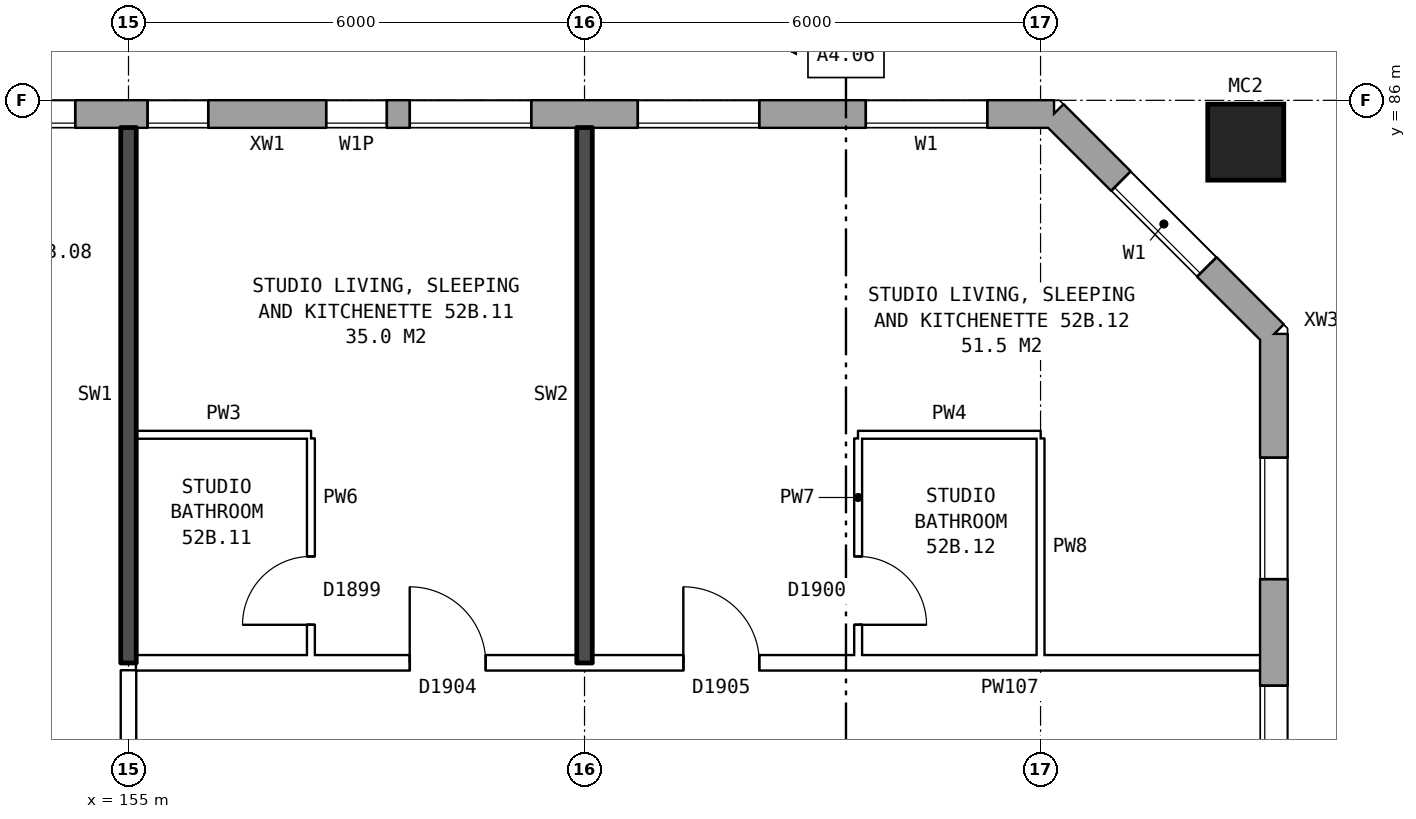
"""IFC4 building model, lengths in metres.
Left out: names, types, materials, properties, quantities, classifications, styles, units other than length and angle.
Written with IfcOpenShell. Run it as: python <this file> out.ifc"""

import sys

from ifc_helpers import new_model, si_unit, direction, frame, frame_2d, origin, origin_2d, place, context, subcontext, project, spatial, rectangle, hollow_rectangle, extrude, element, fill, save


model = new_model("IFC4")
c1 = context("Model", 3, precision=1e-05, world=origin(), true_north=direction((0.0, 1.0)))
c2 = subcontext(c1, "Body", "Model", "MODEL_VIEW")
j1 = project(units=[si_unit("LENGTHUNIT", "METRE"), si_unit("PLANEANGLEUNIT", "RADIAN")], contexts=[c1])
p1 = place(None, origin())
s1 = spatial("IfcSite", under=j1, at=p1, CompositionType="ELEMENT")
p2 = place(p1, origin())
s2 = spatial("IfcBuilding", under=s1, at=p2, CompositionType="ELEMENT")
p3 = place(p2, frame((0.0, 0.0, 185.1)))
s3 = spatial("IfcBuildingStorey", under=s2, at=p3, CompositionType="ELEMENT", Elevation=185.1)
p4 = place(p3, frame((169.7, 85.45, 0.0), z_axis=(0.0, 0.0, 1.0), x_axis=(1.0, 0.0, 0.0)))
e1 = element("IfcColumn", 1, at=p4, inside=s3, PredefinedType="COLUMN", context=c2, shape_type="SweptSolid", body=[
    extrude(hollow_rectangle(XDim=1.0, YDim=1.0, WallThickness=0.055, at=origin_2d()), origin(), (0.0, 0.0, 1.0), 3.1),
])
p5 = place(p3, frame((170.07, 57.075, 0.0), z_axis=(0.0, 0.0, 1.0), x_axis=(0.0, 1.0, 0.0)))
e2 = element("IfcWall", 2, at=p5, inside=s3, PredefinedType="STANDARD", context=c2, shape_type="SweptSolid", body=[
    extrude(rectangle(XDim=25.851, YDim=0.36, at=frame_2d((12.925, 0.0))), origin(), (0.0, 0.0, 1.0), 2.85),
])
p6 = place(p5, frame((1.625, 0.0, 0.8)))
e3 = element("IfcOpeningElement", 3, at=p6, cuts=e2, PredefinedType="OPENING", context=c2, shape_type="SweptSolid", body=[
    extrude(rectangle(XDim=1.6, YDim=1.8, at=frame_2d((0.8, 0.9))), frame((0.0, 0.19, 0.0), z_axis=(0.0, -1.0, 0.0), x_axis=(1.0, 0.0, 0.0)), (0.0, 0.0, 1.0), 0.38),
])
p7 = place(p5, frame((4.625, 0.0, 0.8)))
e4 = element("IfcOpeningElement", 4, at=p7, cuts=e2, PredefinedType="OPENING", context=c2, shape_type="SweptSolid", body=[
    extrude(rectangle(XDim=1.6, YDim=1.8, at=frame_2d((0.8, 0.9))), frame((0.0, 0.19, 0.0), z_axis=(0.0, -1.0, 0.0), x_axis=(1.0, 0.0, 0.0)), (0.0, 0.0, 1.0), 0.38),
])
p8 = place(p5, frame((8.025, 0.0, 1.7)))
e5 = element("IfcOpeningElement", 5, at=p8, cuts=e2, PredefinedType="OPENING", context=c2, shape_type="SweptSolid", body=[
    extrude(rectangle(XDim=1.0, YDim=0.9, at=frame_2d((0.5, 0.45))), frame((0.0, 0.19, 0.0), z_axis=(0.0, -1.0, 0.0), x_axis=(1.0, 0.0, 0.0)), (0.0, 0.0, 1.0), 0.38),
])
p9 = place(p5, frame((10.625, 0.0, 0.8)))
e6 = element("IfcOpeningElement", 6, at=p9, cuts=e2, PredefinedType="OPENING", context=c2, shape_type="SweptSolid", body=[
    extrude(rectangle(XDim=1.6, YDim=1.8, at=frame_2d((0.8, 0.9))), frame((0.0, 0.19, 0.0), z_axis=(0.0, -1.0, 0.0), x_axis=(1.0, 0.0, 0.0)), (0.0, 0.0, 1.0), 0.38),
])
p10 = place(p5, frame((13.625, 0.0, 0.8)))
e7 = element("IfcOpeningElement", 7, at=p10, cuts=e2, PredefinedType="OPENING", context=c2, shape_type="SweptSolid", body=[
    extrude(rectangle(XDim=1.6, YDim=1.8, at=frame_2d((0.8, 0.9))), frame((0.0, 0.19, 0.0), z_axis=(0.0, -1.0, 0.0), x_axis=(1.0, 0.0, 0.0)), (0.0, 0.0, 1.0), 0.38),
])
p11 = place(p5, frame((9.325, 0.0, 0.8)))
e8 = element("IfcOpeningElement", 8, at=p11, cuts=e2, PredefinedType="OPENING", context=c2, shape_type="SweptSolid", body=[
    extrude(rectangle(XDim=1.0, YDim=1.8, at=frame_2d((0.5, 0.9))), frame((0.0, 0.19, 0.0), z_axis=(0.0, -1.0, 0.0), x_axis=(1.0, 0.0, 0.0)), (0.0, 0.0, 1.0), 0.38),
])
p12 = place(p5, frame((19.625, 0.0, 0.8)))
e9 = element("IfcOpeningElement", 9, at=p12, cuts=e2, PredefinedType="OPENING", context=c2, shape_type="SweptSolid", body=[
    extrude(rectangle(XDim=1.6, YDim=1.8, at=frame_2d((0.8, 0.9))), frame((0.0, 0.19, 0.0), z_axis=(0.0, -1.0, 0.0), x_axis=(1.0, 0.0, 0.0)), (0.0, 0.0, 1.0), 0.38),
])
p13 = place(p5, frame((22.625, 0.0, 0.8)))
e10 = element("IfcOpeningElement", 10, at=p13, cuts=e2, PredefinedType="OPENING", context=c2, shape_type="SweptSolid", body=[
    extrude(rectangle(XDim=1.6, YDim=1.8, at=frame_2d((0.8, 0.9))), frame((0.0, 0.19, 0.0), z_axis=(0.0, -1.0, 0.0), x_axis=(1.0, 0.0, 0.0)), (0.0, 0.0, 1.0), 0.38),
])
p14 = place(p5, frame((12.525, 0.0, 0.8)))
e11 = element("IfcOpeningElement", 11, at=p14, cuts=e2, PredefinedType="OPENING", context=c2, shape_type="SweptSolid", body=[
    extrude(rectangle(XDim=0.8, YDim=1.8, at=frame_2d((0.4, 0.9))), frame((0.0, 0.19, 0.0), z_axis=(0.0, -1.0, 0.0), x_axis=(1.0, 0.0, 0.0)), (0.0, 0.0, 1.0), 0.38),
])
p15 = place(p5, frame((15.525, 0.0, 0.8)))
e12 = element("IfcOpeningElement", 12, at=p15, cuts=e2, PredefinedType="OPENING", context=c2, shape_type="SweptSolid", body=[
    extrude(rectangle(XDim=1.0, YDim=1.8, at=frame_2d((0.5, 0.9))), frame((0.0, 0.19, 0.0), z_axis=(0.0, -1.0, 0.0), x_axis=(1.0, 0.0, 0.0)), (0.0, 0.0, 1.0), 0.38),
])
p16 = place(p5, frame((16.825, 0.0, 1.7)))
e13 = element("IfcOpeningElement", 13, at=p16, cuts=e2, PredefinedType="OPENING", context=c2, shape_type="SweptSolid", body=[
    extrude(rectangle(XDim=1.0, YDim=0.9, at=frame_2d((0.5, 0.45))), frame((0.0, 0.19, 0.0), z_axis=(0.0, -1.0, 0.0), x_axis=(1.0, 0.0, 0.0)), (0.0, 0.0, 1.0), 0.38),
])
p17 = place(p3, frame((170.07, 82.925, 0.0), z_axis=(0.0, 0.0, 1.0), x_axis=(-0.707106781187, 0.707106781187, 0.0)))
e14 = element("IfcWall", 14, at=p17, inside=s3, PredefinedType="STANDARD", context=c2, shape_type="SweptSolid", body=[
    extrude(rectangle(XDim=4.094, YDim=0.36, at=frame_2d((2.047, 0.0))), origin(), (0.0, 0.0, 1.0), 2.85),
])
p18 = place(p17, frame((1.247, 0.0, 0.8)))
e15 = element("IfcOpeningElement", 15, at=p18, cuts=e14, PredefinedType="OPENING", context=c2, shape_type="SweptSolid", body=[
    extrude(rectangle(XDim=1.6, YDim=1.8, at=frame_2d((0.8, 0.9))), frame((0.0, 0.19, 0.0), z_axis=(0.0, -1.0, 0.0), x_axis=(1.0, 0.0, 0.0)), (0.0, 0.0, 1.0), 0.38),
])
p19 = place(p3, frame((167.175, 85.82, 0.0), z_axis=(0.0, 0.0, 1.0), x_axis=(-1.0, 0.0, 0.0)))
e16 = element("IfcWall", 16, at=p19, inside=s3, PredefinedType="STANDARD", context=c2, shape_type="SweptSolid", body=[
    extrude(rectangle(XDim=33.101, YDim=0.36, at=frame_2d((16.55, 0.0))), origin(), (0.0, 0.0, 1.0), 2.85),
])
p20 = place(p19, frame((0.875, 0.0, 0.8)))
e17 = element("IfcOpeningElement", 17, at=p20, cuts=e16, PredefinedType="OPENING", context=c2, shape_type="SweptSolid", body=[
    extrude(rectangle(XDim=1.6, YDim=1.8, at=frame_2d((0.8, 0.9))), frame((0.0, 0.19, 0.0), z_axis=(0.0, -1.0, 0.0), x_axis=(1.0, 0.0, 0.0)), (0.0, 0.0, 1.0), 0.38),
])
p21 = place(p19, frame((3.875, 0.0, 0.8)))
e18 = element("IfcOpeningElement", 18, at=p21, cuts=e16, PredefinedType="OPENING", context=c2, shape_type="SweptSolid", body=[
    extrude(rectangle(XDim=1.6, YDim=1.8, at=frame_2d((0.8, 0.9))), frame((0.0, 0.19, 0.0), z_axis=(0.0, -1.0, 0.0), x_axis=(1.0, 0.0, 0.0)), (0.0, 0.0, 1.0), 0.38),
])
p22 = place(p19, frame((6.875, 0.0, 0.8)))
e19 = element("IfcOpeningElement", 19, at=p22, cuts=e16, PredefinedType="OPENING", context=c2, shape_type="SweptSolid", body=[
    extrude(rectangle(XDim=1.6, YDim=1.8, at=frame_2d((0.8, 0.9))), frame((0.0, 0.19, 0.0), z_axis=(0.0, -1.0, 0.0), x_axis=(1.0, 0.0, 0.0)), (0.0, 0.0, 1.0), 0.38),
])
p23 = place(p19, frame((8.775, 0.0, 1.4)))
e20 = element("IfcOpeningElement", 20, at=p23, cuts=e16, PredefinedType="OPENING", context=c2, shape_type="SweptSolid", body=[
    extrude(rectangle(XDim=0.8, YDim=1.2, at=frame_2d((0.4, 0.6))), frame((0.0, 0.19, 0.0), z_axis=(0.0, -1.0, 0.0), x_axis=(1.0, 0.0, 0.0)), (0.0, 0.0, 1.0), 0.38),
])
p24 = place(p19, frame((12.875, 0.0, 0.8)))
e21 = element("IfcOpeningElement", 21, at=p24, cuts=e16, PredefinedType="OPENING", context=c2, shape_type="SweptSolid", body=[
    extrude(rectangle(XDim=1.6, YDim=1.8, at=frame_2d((0.8, 0.9))), frame((0.0, 0.19, 0.0), z_axis=(0.0, -1.0, 0.0), x_axis=(1.0, 0.0, 0.0)), (0.0, 0.0, 1.0), 0.38),
])
p25 = place(p19, frame((15.875, 0.0, 0.8)))
e22 = element("IfcOpeningElement", 22, at=p25, cuts=e16, PredefinedType="OPENING", context=c2, shape_type="SweptSolid", body=[
    extrude(rectangle(XDim=1.6, YDim=1.8, at=frame_2d((0.8, 0.9))), frame((0.0, 0.19, 0.0), z_axis=(0.0, -1.0, 0.0), x_axis=(1.0, 0.0, 0.0)), (0.0, 0.0, 1.0), 0.38),
])
p26 = place(p19, frame((18.875, 0.0, 0.8)))
e23 = element("IfcOpeningElement", 23, at=p26, cuts=e16, PredefinedType="OPENING", context=c2, shape_type="SweptSolid", body=[
    extrude(rectangle(XDim=1.6, YDim=1.8, at=frame_2d((0.8, 0.9))), frame((0.0, 0.19, 0.0), z_axis=(0.0, -1.0, 0.0), x_axis=(1.0, 0.0, 0.0)), (0.0, 0.0, 1.0), 0.38),
])
p27 = place(p19, frame((21.325, 0.0, 0.25)))
e24 = element("IfcOpeningElement", 24, at=p27, cuts=e16, PredefinedType="OPENING", context=c2, shape_type="SweptSolid", body=[
    extrude(rectangle(XDim=0.6, YDim=1.8, at=frame_2d((0.3, 0.9))), frame((0.0, 0.19, 0.0), z_axis=(0.0, -1.0, 0.0), x_axis=(1.0, 0.0, 0.0)), (0.0, 0.0, 1.0), 0.38),
])
p28 = place(p19, frame((24.875, 0.0, 0.8)))
e25 = element("IfcOpeningElement", 25, at=p28, cuts=e16, PredefinedType="OPENING", context=c2, shape_type="SweptSolid", body=[
    extrude(rectangle(XDim=1.6, YDim=1.8, at=frame_2d((0.8, 0.9))), frame((0.0, 0.19, 0.0), z_axis=(0.0, -1.0, 0.0), x_axis=(1.0, 0.0, 0.0)), (0.0, 0.0, 1.0), 0.38),
])
p29 = place(p19, frame((27.875, 0.0, 0.8)))
e26 = element("IfcOpeningElement", 26, at=p29, cuts=e16, PredefinedType="OPENING", context=c2, shape_type="SweptSolid", body=[
    extrude(rectangle(XDim=1.6, YDim=1.8, at=frame_2d((0.8, 0.9))), frame((0.0, 0.19, 0.0), z_axis=(0.0, -1.0, 0.0), x_axis=(1.0, 0.0, 0.0)), (0.0, 0.0, 1.0), 0.38),
])
p30 = place(p19, frame((30.875, 0.0, 0.8)))
e27 = element("IfcOpeningElement", 27, at=p30, cuts=e16, PredefinedType="OPENING", context=c2, shape_type="SweptSolid", body=[
    extrude(rectangle(XDim=1.6, YDim=1.8, at=frame_2d((0.8, 0.9))), frame((0.0, 0.19, 0.0), z_axis=(0.0, -1.0, 0.0), x_axis=(1.0, 0.0, 0.0)), (0.0, 0.0, 1.0), 0.38),
])
p31 = place(p19, frame((11.125, 0.0, 0.8)))
e28 = element("IfcOpeningElement", 28, at=p31, cuts=e16, PredefinedType="OPENING", context=c2, shape_type="SweptSolid", body=[
    extrude(rectangle(XDim=0.8, YDim=1.2, at=frame_2d((0.4, 0.6))), frame((0.0, 0.19, 0.0), z_axis=(0.0, -1.0, 0.0), x_axis=(1.0, 0.0, 0.0)), (0.0, 0.0, 1.0), 0.38),
])
p32 = place(p19, frame((22.225, 0.0, 0.15)))
e29 = element("IfcOpeningElement", 29, at=p32, cuts=e16, PredefinedType="OPENING", context=c2, shape_type="SweptSolid", body=[
    extrude(rectangle(XDim=0.6, YDim=0.9, at=frame_2d((0.3, 0.45))), frame((0.0, 0.19, 0.0), z_axis=(0.0, -1.0, 0.0), x_axis=(1.0, 0.0, 0.0)), (0.0, 0.0, 1.0), 0.38),
])
p33 = place(p19, frame((23.325, 0.0, 1.65)))
e30 = element("IfcOpeningElement", 30, at=p33, cuts=e16, PredefinedType="OPENING", context=c2, shape_type="SweptSolid", body=[
    extrude(rectangle(XDim=0.6, YDim=0.9, at=frame_2d((0.3, 0.45))), frame((0.0, 0.19, 0.0), z_axis=(0.0, -1.0, 0.0), x_axis=(1.0, 0.0, 0.0)), (0.0, 0.0, 1.0), 0.38),
])
p34 = place(p3, frame((155.1, 78.6, 0.0), z_axis=(0.0, 0.0, 1.0), x_axis=(1.0, 0.0, 0.0)))
e31 = element("IfcWall", 31, at=p34, inside=s3, PredefinedType="PARTITIONING", context=c2, shape_type="SweptSolid", body=[
    extrude(rectangle(XDim=14.79, YDim=0.2, at=frame_2d((7.395, 0.0))), origin(), (0.0, 0.0, 1.0), 2.85),
])
p35 = place(p34, frame((3.6, 0.0, 0.0)))
e32 = element("IfcOpeningElement", 32, at=p35, cuts=e31, PredefinedType="OPENING", context=c2, shape_type="SweptSolid", body=[
    extrude(rectangle(XDim=1.0, YDim=2.1, at=frame_2d((0.5, 1.05))), frame((0.0, 0.11, 0.0), z_axis=(0.0, -1.0, 0.0), x_axis=(1.0, 0.0, 0.0)), (0.0, 0.0, 1.0), 0.22),
])
p36 = place(p34, frame((7.2, 0.0, 0.0)))
e33 = element("IfcOpeningElement", 33, at=p36, cuts=e31, PredefinedType="OPENING", context=c2, shape_type="SweptSolid", body=[
    extrude(rectangle(XDim=1.0, YDim=2.1, at=frame_2d((0.5, 1.05))), frame((0.0, 0.11, 0.0), z_axis=(0.0, -1.0, 0.0), x_axis=(1.0, 0.0, 0.0)), (0.0, 0.0, 1.0), 0.22),
])
p37 = place(p3, frame((155.1, 81.6, 0.0), z_axis=(0.0, 0.0, 1.0), x_axis=(1.0, 0.0, 0.0)))
e34 = element("IfcWall", 34, at=p37, inside=s3, PredefinedType="PARTITIONING", context=c2, shape_type="SweptSolid", body=[
    extrude(rectangle(XDim=2.3, YDim=0.1, at=frame_2d((1.15, 0.0))), origin(), (0.0, 0.0, 1.0), 2.85),
])
p38 = place(p3, frame((164.6, 81.6, 0.0), z_axis=(0.0, 0.0, 1.0), x_axis=(1.0, 0.0, 0.0)))
e35 = element("IfcWall", 35, at=p38, inside=s3, PredefinedType="PARTITIONING", context=c2, shape_type="SweptSolid", body=[
    extrude(rectangle(XDim=2.4, YDim=0.1, at=frame_2d((1.2, 0.0))), origin(), (0.0, 0.0, 1.0), 2.85),
])
p39 = place(p3, frame((155.0, 76.3, 0.0), z_axis=(0.0, 0.0, 1.0), x_axis=(0.0, 1.0, 0.0)))
e36 = element("IfcWall", 36, at=p39, inside=s3, PredefinedType="PARTITIONING", context=c2, shape_type="SweptSolid", body=[
    extrude(rectangle(XDim=2.2, YDim=0.2, at=frame_2d((1.1, 0.0))), origin(), (0.0, 0.0, 1.0), 2.85),
])
p40 = place(p3, frame((155.0, 78.6, 0.0), z_axis=(0.0, 0.0, 1.0), x_axis=(0.0, 1.0, 0.0)))
e37 = element("IfcWall", 37, at=p40, inside=s3, PredefinedType="SOLIDWALL", context=c2, shape_type="SweptSolid", body=[
    extrude(rectangle(XDim=7.04, YDim=0.2, at=frame_2d((3.52, 0.0))), origin(), (0.0, 0.0, 1.0), 2.85),
])
p41 = place(p3, frame((157.4, 78.7, 0.0), z_axis=(0.0, 0.0, 1.0), x_axis=(0.0, 1.0, 0.0)))
e38 = element("IfcWall", 38, at=p41, inside=s3, PredefinedType="PARTITIONING", context=c2, shape_type="SweptSolid", body=[
    extrude(rectangle(XDim=2.85, YDim=0.1, at=frame_2d((1.425, 0.0))), origin(), (0.0, 0.0, 1.0), 2.85),
])
p42 = place(p41, frame((0.4, 0.0, 0.0)))
e39 = element("IfcOpeningElement", 39, at=p42, cuts=e38, PredefinedType="OPENING", context=c2, shape_type="SweptSolid", body=[
    extrude(rectangle(XDim=0.9, YDim=2.1, at=frame_2d((0.45, 1.05))), frame((0.0, 0.06, 0.0), z_axis=(0.0, -1.0, 0.0), x_axis=(1.0, 0.0, 0.0)), (0.0, 0.0, 1.0), 0.12),
])
p43 = place(p3, frame((161.0, 78.6, 0.0), z_axis=(0.0, 0.0, 1.0), x_axis=(0.0, 1.0, 0.0)))
e40 = element("IfcWall", 40, at=p43, inside=s3, PredefinedType="SOLIDWALL", context=c2, shape_type="SweptSolid", body=[
    extrude(rectangle(XDim=7.04, YDim=0.2, at=frame_2d((3.52, 0.0))), origin(), (0.0, 0.0, 1.0), 2.85),
])
p44 = place(p3, frame((164.6, 78.7, 0.0), z_axis=(0.0, 0.0, 1.0), x_axis=(0.0, 1.0, 0.0)))
e41 = element("IfcWall", 41, at=p44, inside=s3, PredefinedType="PARTITIONING", context=c2, shape_type="SweptSolid", body=[
    extrude(rectangle(XDim=2.85, YDim=0.1, at=frame_2d((1.425, 0.0))), origin(), (0.0, 0.0, 1.0), 2.85),
])
p45 = place(p44, frame((0.4, 0.0, 0.0)))
e42 = element("IfcOpeningElement", 42, at=p45, cuts=e41, PredefinedType="OPENING", context=c2, shape_type="SweptSolid", body=[
    extrude(rectangle(XDim=0.9, YDim=2.1, at=frame_2d((0.45, 1.05))), frame((0.0, 0.06, 0.0), z_axis=(0.0, -1.0, 0.0), x_axis=(1.0, 0.0, 0.0)), (0.0, 0.0, 1.0), 0.12),
])
p46 = place(p3, frame((167.0, 78.7, 0.0), z_axis=(0.0, 0.0, 1.0), x_axis=(0.0, 1.0, 0.0)))
e43 = element("IfcWall", 43, at=p46, inside=s3, PredefinedType="PARTITIONING", context=c2, shape_type="SweptSolid", body=[
    extrude(rectangle(XDim=2.85, YDim=0.1, at=frame_2d((1.425, 0.0))), origin(), (0.0, 0.0, 1.0), 2.85),
])
p47 = place(p12, origin())
e44 = element("IfcWindow", 44, at=p47, inside=s3, PartitioningType="SINGLE_PANEL", PredefinedType="WINDOW", context=c2, shape_type="SweptSolid", body=[
    extrude(rectangle(XDim=1.6, YDim=1.8, at=frame_2d((0.8, 0.9))), frame((0.0, 0.15, 0.0), z_axis=(0.0, -1.0, 0.0), x_axis=(1.0, 0.0, 0.0)), (0.0, 0.0, 1.0), 0.06),
])
fill(e9, e44)
p48 = place(p13, origin())
e45 = element("IfcWindow", 45, at=p48, inside=s3, PartitioningType="SINGLE_PANEL", PredefinedType="WINDOW", context=c2, shape_type="SweptSolid", body=[
    extrude(rectangle(XDim=1.6, YDim=1.8, at=frame_2d((0.8, 0.9))), frame((0.0, 0.15, 0.0), z_axis=(0.0, -1.0, 0.0), x_axis=(1.0, 0.0, 0.0)), (0.0, 0.0, 1.0), 0.06),
])
fill(e10, e45)
p49 = place(p18, origin())
e46 = element("IfcWindow", 46, at=p49, inside=s3, PartitioningType="SINGLE_PANEL", PredefinedType="WINDOW", context=c2, shape_type="SweptSolid", body=[
    extrude(rectangle(XDim=1.6, YDim=1.8, at=frame_2d((0.8, 0.9))), frame((0.0, 0.15, 0.0), z_axis=(0.0, -1.0, 0.0), x_axis=(1.0, 0.0, 0.0)), (0.0, 0.0, 1.0), 0.06),
])
fill(e15, e46)
p50 = place(p20, origin())
e47 = element("IfcWindow", 47, at=p50, inside=s3, PartitioningType="SINGLE_PANEL", PredefinedType="WINDOW", context=c2, shape_type="SweptSolid", body=[
    extrude(rectangle(XDim=1.6, YDim=1.8, at=frame_2d((0.8, 0.9))), frame((0.0, 0.15, 0.0), z_axis=(0.0, -1.0, 0.0), x_axis=(1.0, 0.0, 0.0)), (0.0, 0.0, 1.0), 0.06),
])
fill(e17, e47)
p51 = place(p21, origin())
e48 = element("IfcWindow", 48, at=p51, inside=s3, PartitioningType="SINGLE_PANEL", PredefinedType="WINDOW", context=c2, shape_type="SweptSolid", body=[
    extrude(rectangle(XDim=1.6, YDim=1.8, at=frame_2d((0.8, 0.9))), frame((0.0, 0.15, 0.0), z_axis=(0.0, -1.0, 0.0), x_axis=(1.0, 0.0, 0.0)), (0.0, 0.0, 1.0), 0.06),
])
fill(e18, e48)
p52 = place(p22, origin())
e49 = element("IfcWindow", 49, at=p52, inside=s3, PartitioningType="SINGLE_PANEL", PredefinedType="WINDOW", context=c2, shape_type="SweptSolid", body=[
    extrude(rectangle(XDim=1.6, YDim=1.8, at=frame_2d((0.8, 0.9))), frame((0.0, 0.15, 0.0), z_axis=(0.0, -1.0, 0.0), x_axis=(1.0, 0.0, 0.0)), (0.0, 0.0, 1.0), 0.06),
])
fill(e19, e49)
p53 = place(p23, origin())
e50 = element("IfcWindow", 50, at=p53, inside=s3, PartitioningType="SINGLE_PANEL", PredefinedType="WINDOW", context=c2, shape_type="SweptSolid", body=[
    extrude(rectangle(XDim=0.8, YDim=1.2, at=frame_2d((0.4, 0.6))), frame((0.0, 0.15, 0.0), z_axis=(0.0, -1.0, 0.0), x_axis=(1.0, 0.0, 0.0)), (0.0, 0.0, 1.0), 0.06),
])
fill(e20, e50)
p54 = place(p24, origin())
e51 = element("IfcWindow", 51, at=p54, inside=s3, PartitioningType="SINGLE_PANEL", PredefinedType="WINDOW", context=c2, shape_type="SweptSolid", body=[
    extrude(rectangle(XDim=1.6, YDim=1.8, at=frame_2d((0.8, 0.9))), frame((0.0, 0.15, 0.0), z_axis=(0.0, -1.0, 0.0), x_axis=(1.0, 0.0, 0.0)), (0.0, 0.0, 1.0), 0.06),
])
fill(e21, e51)
p55 = place(p35, origin())
e52 = element("IfcDoor", 52, at=p55, inside=s3, OperationType="SINGLE_SWING_LEFT", PredefinedType="DOOR", context=c2, shape_type="SweptSolid", body=[
    extrude(rectangle(XDim=1.0, YDim=2.1, at=frame_2d((0.5, 1.05))), frame((0.0, 0.025, 0.0), z_axis=(0.0, -1.0, 0.0), x_axis=(1.0, 0.0, 0.0)), (0.0, 0.0, 1.0), 0.05),
])
fill(e32, e52)
p56 = place(p42, origin())
e53 = element("IfcDoor", 53, at=p56, inside=s3, OperationType="SINGLE_SWING_LEFT", PredefinedType="DOOR", context=c2, shape_type="SweptSolid", body=[
    extrude(rectangle(XDim=0.9, YDim=2.1, at=frame_2d((0.45, 1.05))), frame((0.0, 0.025, 0.0), z_axis=(0.0, -1.0, 0.0), x_axis=(1.0, 0.0, 0.0)), (0.0, 0.0, 1.0), 0.05),
])
fill(e39, e53)
p57 = place(p36, origin())
e54 = element("IfcDoor", 54, at=p57, inside=s3, OperationType="SINGLE_SWING_LEFT", PredefinedType="DOOR", context=c2, shape_type="SweptSolid", body=[
    extrude(rectangle(XDim=1.0, YDim=2.1, at=frame_2d((0.5, 1.05))), frame((0.0, 0.025, 0.0), z_axis=(0.0, -1.0, 0.0), x_axis=(1.0, 0.0, 0.0)), (0.0, 0.0, 1.0), 0.05),
])
fill(e33, e54)
p58 = place(p45, frame((0.9, 0.0, 0.0), z_axis=(0.0, 0.0, 1.0), x_axis=(-1.0, 0.0, 0.0)))
e55 = element("IfcDoor", 55, at=p58, inside=s3, OperationType="SINGLE_SWING_RIGHT", PredefinedType="DOOR", context=c2, shape_type="SweptSolid", body=[
    extrude(rectangle(XDim=0.9, YDim=2.1, at=frame_2d((0.45, 1.05))), frame((0.0, 0.025, 0.0), z_axis=(0.0, -1.0, 0.0), x_axis=(1.0, 0.0, 0.0)), (0.0, 0.0, 1.0), 0.05),
])
fill(e42, e55)
p59 = place(p31, origin())
e56 = element("IfcWindow", 56, at=p59, inside=s3, PartitioningType="SINGLE_PANEL", PredefinedType="WINDOW", context=c2, shape_type="SweptSolid", body=[
    extrude(rectangle(XDim=0.8, YDim=1.2, at=frame_2d((0.4, 0.6))), frame((0.0, 0.15, 0.0), z_axis=(0.0, -1.0, 0.0), x_axis=(1.0, 0.0, 0.0)), (0.0, 0.0, 1.0), 0.06),
])
fill(e28, e56)
save(model, sys.argv[1])
